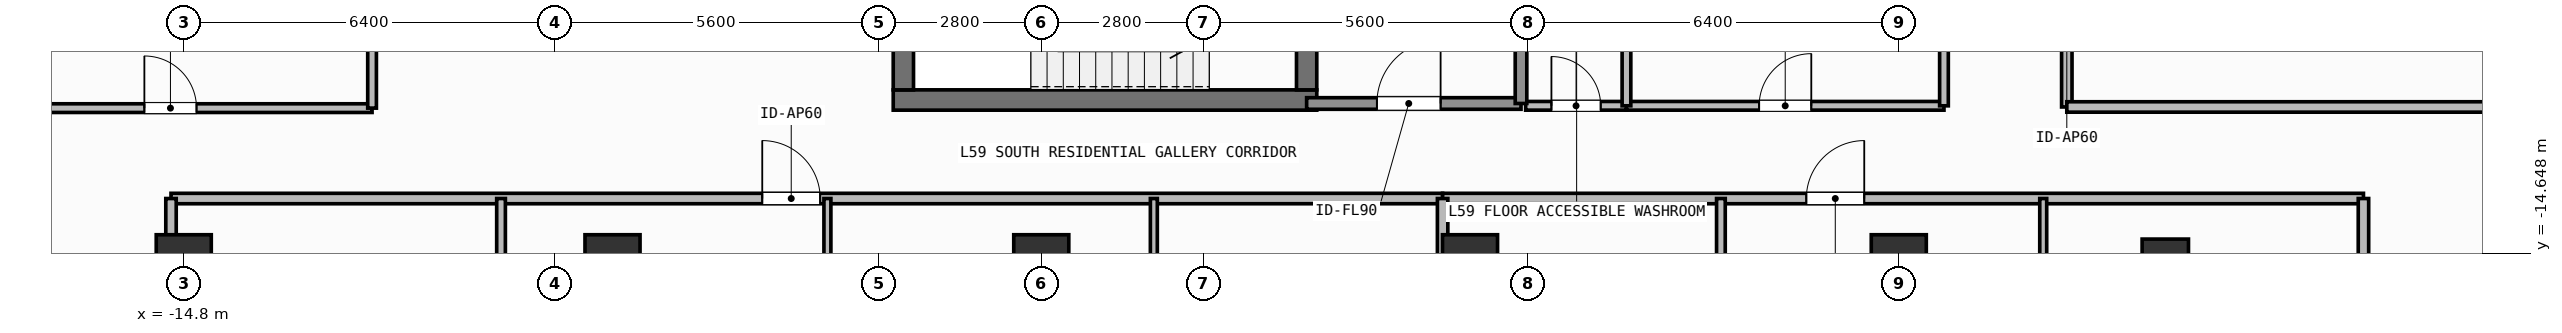
"""IFC4 building model, lengths in metres.
Left out: names, types, materials, properties, quantities, classifications, styles, units other than length and angle.
Written with IfcOpenShell. Run it as: python <this file> out.ifc"""

import sys

from ifc_helpers import new_model, si_unit, direction, frame, frame_2d, origin, origin_2d, place, context, subcontext, project, spatial, rectangle, hollow_rectangle, extrude, element, fill, save


model = new_model("IFC4")
c1 = context("Model", 3, precision=1e-05, world=origin(), true_north=direction((0.0, 1.0)))
c2 = subcontext(c1, "Body", "Model", "MODEL_VIEW")
j1 = project(units=[si_unit("LENGTHUNIT", "METRE"), si_unit("PLANEANGLEUNIT", "RADIAN")], contexts=[c1])
p1 = place(None, origin())
s1 = spatial("IfcSite", under=j1, at=p1, CompositionType="ELEMENT")
p2 = place(p1, origin())
s2 = spatial("IfcBuilding", under=s1, at=p2, CompositionType="ELEMENT")
p3 = place(p2, frame((0.0, 0.0, 243.0)))
s3 = spatial("IfcBuildingStorey", under=s2, at=p3, CompositionType="ELEMENT", Elevation=243.0)
p4 = place(p3, frame((-2.555, -12.0, 0.0), z_axis=(0.0, 0.0, 1.0), x_axis=(1.0, 0.0, 0.0)))
e1 = element("IfcWall", 1, at=p4, inside=s3, PredefinedType="SHEAR", context=c2, shape_type="SweptSolid", body=[
    extrude(rectangle(XDim=7.31, YDim=0.35, at=frame_2d((3.655, 0.0))), origin(), (0.0, 0.0, 1.0), 3.9),
])
p5 = place(p3, frame((-2.38, -11.825, 0.0), z_axis=(0.0, 0.0, 1.0), x_axis=(0.0, 1.0, 0.0)))
e2 = element("IfcWall", 2, at=p5, inside=s3, PredefinedType="SHEAR", context=c2, shape_type="SweptSolid", body=[
    extrude(rectangle(XDim=2.925, YDim=0.35, at=frame_2d((1.462, 0.0))), origin(), (0.0, 0.0, 1.0), 3.9),
])
p6 = place(p3, frame((4.58, -8.9, 0.0), z_axis=(0.0, 0.0, 1.0), x_axis=(0.0, -1.0, 0.0)))
e3 = element("IfcWall", 3, at=p6, inside=s3, PredefinedType="SHEAR", context=c2, shape_type="SweptSolid", body=[
    extrude(rectangle(XDim=2.925, YDim=0.35, at=frame_2d((1.462, 0.0))), origin(), (0.0, 0.0, 1.0), 3.9),
])
p7 = place(p6, frame((0.913, 0.0, 0.0)))
e4 = element("IfcOpeningElement", 4, at=p7, cuts=e3, PredefinedType="OPENING", context=c2, shape_type="SweptSolid", body=[
    extrude(rectangle(XDim=1.1, YDim=2.15, at=frame_2d((0.55, 1.075))), frame((0.0, 0.185, 0.0), z_axis=(0.0, -1.0, 0.0), x_axis=(1.0, 0.0, 0.0)), (0.0, 0.0, 1.0), 0.37),
])
for number, where, z_axis, x_axis in (
    (5, (-14.8, -14.8, 0.0), (0.0, 0.0, 1.0), (1.0, 0.0, 0.0)),
    (6, (-7.4, -14.8, 0.0), (0.0, 0.0, 1.0), (1.0, 0.0, 0.0)),
    (7, (0.0, -14.8, 0.0), (0.0, 0.0, 1.0), (1.0, 0.0, 0.0)),
    (8, (7.4, -14.8, 0.0), (0.0, 0.0, 1.0), (1.0, 0.0, 0.0)),
    (9, (14.8, -14.8, 0.0), (0.0, 0.0, 1.0), (1.0, 0.0, 0.0)),
):
    element("IfcColumn", number, at=place(p3, frame(where, z_axis=z_axis, x_axis=x_axis)), inside=s3, PredefinedType="COLUMN", context=c2, shape_type="SweptSolid", body=[
        extrude(rectangle(XDim=0.95, YDim=0.95, at=origin_2d()), origin(), (0.0, 0.0, 1.0), 3.9),
    ])
p8 = place(p3, frame((19.4, -14.8, 0.0), z_axis=(0.0, 0.0, 1.0), x_axis=(1.0, 0.0, 0.0)))
e10 = element("IfcColumn", 10, at=p8, inside=s3, PredefinedType="COLUMN", context=c2, shape_type="SweptSolid", body=[
    extrude(hollow_rectangle(XDim=0.8, YDim=0.8, WallThickness=0.036, at=origin_2d()), origin(), (0.0, 0.0, 1.0), 3.9),
])
p9 = place(p3, frame((4.58, -12.06, 0.0), z_axis=(0.0, 0.0, 1.0), x_axis=(1.0, 0.0, 0.0)))
e11 = element("IfcWall", 11, at=p9, inside=s3, PredefinedType="SOLIDWALL", context=c2, shape_type="SweptSolid", body=[
    extrude(rectangle(XDim=3.7, YDim=0.2, at=frame_2d((1.85, 0.0))), origin(), (0.0, 0.0, 1.0), 3.68),
])
p10 = place(p9, frame((1.212, 0.0, 0.0)))
e12 = element("IfcOpeningElement", 12, at=p10, cuts=e11, PredefinedType="OPENING", context=c2, shape_type="SweptSolid", body=[
    extrude(rectangle(XDim=1.1, YDim=2.15, at=frame_2d((0.55, 1.075))), frame((0.0, 0.11, 0.0), z_axis=(0.0, -1.0, 0.0), x_axis=(1.0, 0.0, 0.0)), (0.0, 0.0, 1.0), 0.22),
])
p11 = place(p3, frame((8.36, -12.1, 0.0), z_axis=(0.0, 0.0, 1.0), x_axis=(1.0, 0.0, 0.0)))
e13 = element("IfcWall", 13, at=p11, inside=s3, PredefinedType="PARTITIONING", context=c2, shape_type="SweptSolid", body=[
    extrude(rectangle(XDim=1.74, YDim=0.15, at=frame_2d((0.87, 0.0))), origin(), (0.0, 0.0, 1.0), 3.68),
])
p12 = place(p11, frame((0.445, 0.0, 0.0)))
e14 = element("IfcOpeningElement", 14, at=p12, cuts=e13, PredefinedType="OPENING", context=c2, shape_type="SweptSolid", body=[
    extrude(rectangle(XDim=0.85, YDim=2.1, at=frame_2d((0.425, 1.05))), frame((0.0, 0.085, 0.0), z_axis=(0.0, -1.0, 0.0), x_axis=(1.0, 0.0, 0.0)), (0.0, 0.0, 1.0), 0.17),
])
p13 = place(p3, frame((10.1, -12.1, 0.0), z_axis=(0.0, 0.0, 1.0), x_axis=(1.0, 0.0, 0.0)))
e15 = element("IfcWall", 15, at=p13, inside=s3, PredefinedType="PARTITIONING", context=c2, shape_type="SweptSolid", body=[
    extrude(rectangle(XDim=5.48, YDim=0.15, at=frame_2d((2.74, 0.0))), origin(), (0.0, 0.0, 1.0), 3.68),
])
p14 = place(p13, frame((2.29, 0.0, 0.0)))
e16 = element("IfcOpeningElement", 16, at=p14, cuts=e15, PredefinedType="OPENING", context=c2, shape_type="SweptSolid", body=[
    extrude(rectangle(XDim=0.9, YDim=2.1, at=frame_2d((0.45, 1.05))), frame((0.0, 0.085, 0.0), z_axis=(0.0, -1.0, 0.0), x_axis=(1.0, 0.0, 0.0)), (0.0, 0.0, 1.0), 0.17),
])
p15 = place(p3, frame((-15.02, -13.7, 0.0), z_axis=(0.0, 0.0, 1.0), x_axis=(1.0, 0.0, 0.0)))
e17 = element("IfcWall", 17, at=p15, inside=s3, PredefinedType="PARTITIONING", context=c2, shape_type="SweptSolid", body=[
    extrude(rectangle(XDim=21.947, YDim=0.18, at=frame_2d((10.974, 0.0))), origin(), (0.0, 0.0, 1.0), 3.68),
])
p16 = place(p15, frame((10.205, 0.0, 0.0)))
e18 = element("IfcOpeningElement", 18, at=p16, cuts=e17, PredefinedType="OPENING", context=c2, shape_type="SweptSolid", body=[
    extrude(rectangle(XDim=1.0, YDim=2.2, at=frame_2d((0.5, 1.1))), frame((0.0, 0.1, 0.0), z_axis=(0.0, -1.0, 0.0), x_axis=(1.0, 0.0, 0.0)), (0.0, 0.0, 1.0), 0.2),
])
p17 = place(p3, frame((-3.691, -24.39, 0.0), z_axis=(0.0, 0.0, 1.0), x_axis=(0.0, 1.0, 0.0)))
e19 = element("IfcWall", 19, at=p17, inside=s3, PredefinedType="PARTITIONING", context=c2, shape_type="SweptSolid", body=[
    extrude(rectangle(XDim=10.69, YDim=0.12, at=frame_2d((5.345, 0.0))), origin(), (0.0, 0.0, 1.0), 3.68),
])
p18 = place(p17, frame((4.806, 0.0, 0.0)))
e20 = element("IfcOpeningElement", 20, at=p18, cuts=e19, PredefinedType="OPENING", context=c2, shape_type="SweptSolid", body=[
    extrude(rectangle(XDim=0.9, YDim=2.1, at=frame_2d((0.45, 1.05))), frame((0.0, 0.07, 0.0), z_axis=(0.0, -1.0, 0.0), x_axis=(1.0, 0.0, 0.0)), (0.0, 0.0, 1.0), 0.14),
])
p19 = place(p3, frame((-9.324, -18.421, 0.0), z_axis=(0.0, 0.0, 1.0), x_axis=(0.0, 1.0, 0.0)))
e21 = element("IfcWall", 21, at=p19, inside=s3, PredefinedType="PARTITIONING", context=c2, shape_type="SweptSolid", body=[
    extrude(rectangle(XDim=4.721, YDim=0.15, at=frame_2d((2.36, 0.0))), origin(), (0.0, 0.0, 1.0), 3.68),
])
p20 = place(p19, frame((1.936, 0.0, 0.0)))
e22 = element("IfcOpeningElement", 22, at=p20, cuts=e21, PredefinedType="OPENING", context=c2, shape_type="SweptSolid", body=[
    extrude(rectangle(XDim=0.85, YDim=2.1, at=frame_2d((0.425, 1.05))), frame((0.0, 0.085, 0.0), z_axis=(0.0, -1.0, 0.0), x_axis=(1.0, 0.0, 0.0)), (0.0, 0.0, 1.0), 0.17),
])
p21 = place(p3, frame((1.943, -18.19, 0.0), z_axis=(0.0, 0.0, 1.0), x_axis=(0.0, 1.0, 0.0)))
e23 = element("IfcWall", 23, at=p21, inside=s3, PredefinedType="PARTITIONING", context=c2, shape_type="SweptSolid", body=[
    extrude(rectangle(XDim=4.49, YDim=0.12, at=frame_2d((2.245, 0.0))), origin(), (0.0, 0.0, 1.0), 3.68),
])
p22 = place(p21, frame((1.907, 0.0, 0.0)))
e24 = element("IfcOpeningElement", 24, at=p22, cuts=e23, PredefinedType="OPENING", context=c2, shape_type="SweptSolid", body=[
    extrude(rectangle(XDim=0.85, YDim=2.1, at=frame_2d((0.425, 1.05))), frame((0.0, 0.07, 0.0), z_axis=(0.0, -1.0, 0.0), x_axis=(1.0, 0.0, 0.0)), (0.0, 0.0, 1.0), 0.14),
])
p23 = place(p3, frame((6.927, -13.7, 0.0), z_axis=(0.0, 0.0, 1.0), x_axis=(1.0, 0.0, 0.0)))
e25 = element("IfcWall", 25, at=p23, inside=s3, PredefinedType="PARTITIONING", context=c2, shape_type="SweptSolid", body=[
    extrude(rectangle(XDim=15.893, YDim=0.18, at=frame_2d((7.947, 0.0))), origin(), (0.0, 0.0, 1.0), 3.68),
])
p24 = place(p23, frame((6.277, 0.0, 0.0)))
e26 = element("IfcOpeningElement", 26, at=p24, cuts=e25, PredefinedType="OPENING", context=c2, shape_type="SweptSolid", body=[
    extrude(rectangle(XDim=1.0, YDim=2.2, at=frame_2d((0.5, 1.1))), frame((0.0, 0.1, 0.0), z_axis=(0.0, -1.0, 0.0), x_axis=(1.0, 0.0, 0.0)), (0.0, 0.0, 1.0), 0.2),
])
p25 = place(p3, frame((11.73, -18.19, 0.0), z_axis=(0.0, 0.0, 1.0), x_axis=(0.0, 1.0, 0.0)))
e27 = element("IfcWall", 27, at=p25, inside=s3, PredefinedType="PARTITIONING", context=c2, shape_type="SweptSolid", body=[
    extrude(rectangle(XDim=4.49, YDim=0.15, at=frame_2d((2.245, 0.0))), origin(), (0.0, 0.0, 1.0), 3.68),
])
p26 = place(p25, frame((1.907, 0.0, 0.0)))
e28 = element("IfcOpeningElement", 28, at=p26, cuts=e27, PredefinedType="OPENING", context=c2, shape_type="SweptSolid", body=[
    extrude(rectangle(XDim=0.85, YDim=2.1, at=frame_2d((0.425, 1.05))), frame((0.0, 0.085, 0.0), z_axis=(0.0, -1.0, 0.0), x_axis=(1.0, 0.0, 0.0)), (0.0, 0.0, 1.0), 0.17),
])
p27 = place(p3, frame((17.293, -18.19, 0.0), z_axis=(0.0, 0.0, 1.0), x_axis=(0.0, 1.0, 0.0)))
e29 = element("IfcWall", 29, at=p27, inside=s3, PredefinedType="PARTITIONING", context=c2, shape_type="SweptSolid", body=[
    extrude(rectangle(XDim=4.49, YDim=0.12, at=frame_2d((2.245, 0.0))), origin(), (0.0, 0.0, 1.0), 3.68),
])
p28 = place(p27, frame((1.907, 0.0, 0.0)))
e30 = element("IfcOpeningElement", 30, at=p28, cuts=e29, PredefinedType="OPENING", context=c2, shape_type="SweptSolid", body=[
    extrude(rectangle(XDim=0.85, YDim=2.1, at=frame_2d((0.425, 1.05))), frame((0.0, 0.07, 0.0), z_axis=(0.0, -1.0, 0.0), x_axis=(1.0, 0.0, 0.0)), (0.0, 0.0, 1.0), 0.14),
])
p29 = place(p3, frame((-18.33, -12.14, 0.0), z_axis=(0.0, 0.0, 1.0), x_axis=(1.0, 0.0, 0.0)))
e31 = element("IfcWall", 31, at=p29, inside=s3, PredefinedType="PARTITIONING", context=c2, shape_type="SweptSolid", body=[
    extrude(rectangle(XDim=6.78, YDim=0.15, at=frame_2d((3.39, 0.0))), origin(), (0.0, 0.0, 1.0), 3.68),
])
p30 = place(p29, frame((2.85, 0.0, 0.0)))
e32 = element("IfcOpeningElement", 32, at=p30, cuts=e31, PredefinedType="OPENING", context=c2, shape_type="SweptSolid", body=[
    extrude(rectangle(XDim=0.9, YDim=2.1, at=frame_2d((0.45, 1.05))), frame((0.0, 0.085, 0.0), z_axis=(0.0, -1.0, 0.0), x_axis=(1.0, 0.0, 0.0)), (0.0, 0.0, 1.0), 0.17),
])
p31 = place(p3, frame((17.7, -12.12, 0.0), z_axis=(0.0, 0.0, 1.0), x_axis=(0.0, 1.0, 0.0)))
e33 = element("IfcWall", 33, at=p31, inside=s3, PredefinedType="PARTITIONING", context=c2, shape_type="SweptSolid", body=[
    extrude(rectangle(XDim=8.98, YDim=0.18, at=frame_2d((4.49, 0.0))), origin(), (0.0, 0.0, 1.0), 3.68),
])
p32 = place(p31, frame((1.407, 0.0, 0.0)))
e34 = element("IfcOpeningElement", 34, at=p32, cuts=e33, PredefinedType="OPENING", context=c2, shape_type="SweptSolid", body=[
    extrude(rectangle(XDim=1.0, YDim=2.2, at=frame_2d((0.5, 1.1))), frame((0.0, 0.1, 0.0), z_axis=(0.0, -1.0, 0.0), x_axis=(1.0, 0.0, 0.0)), (0.0, 0.0, 1.0), 0.2),
])
p33 = place(p3, frame((8.28, -12.06, 0.0), z_axis=(0.0, 0.0, 1.0), x_axis=(0.0, 1.0, 0.0)))
e35 = element("IfcWall", 35, at=p33, inside=s3, PredefinedType="SOLIDWALL", context=c2, shape_type="SweptSolid", body=[
    extrude(rectangle(XDim=3.335, YDim=0.2, at=frame_2d((1.667, 0.0))), origin(), (0.0, 0.0, 1.0), 3.68),
])
p34 = place(p3, frame((10.1, -12.1, 0.0), z_axis=(0.0, 0.0, 1.0), x_axis=(0.0, 1.0, 0.0)))
e36 = element("IfcWall", 36, at=p34, inside=s3, PredefinedType="PARTITIONING", context=c2, shape_type="SweptSolid", body=[
    extrude(rectangle(XDim=2.35, YDim=0.15, at=frame_2d((1.175, 0.0))), origin(), (0.0, 0.0, 1.0), 3.68),
])
p35 = place(p3, frame((15.58, -12.1, 0.0), z_axis=(0.0, 0.0, 1.0), x_axis=(0.0, 1.0, 0.0)))
e37 = element("IfcWall", 37, at=p35, inside=s3, PredefinedType="PARTITIONING", context=c2, shape_type="SweptSolid", body=[
    extrude(rectangle(XDim=6.25, YDim=0.15, at=frame_2d((3.125, 0.0))), origin(), (0.0, 0.0, 1.0), 3.68),
])
p36 = place(p3, frame((6.927, -28.63, 0.0), z_axis=(0.0, 0.0, 1.0), x_axis=(0.0, 1.0, 0.0)))
e38 = element("IfcWall", 38, at=p36, inside=s3, PredefinedType="PARTITIONING", context=c2, shape_type="SweptSolid", body=[
    extrude(rectangle(XDim=14.93, YDim=0.18, at=frame_2d((7.465, 0.0))), origin(), (0.0, 0.0, 1.0), 3.68),
])
for number, where, z_axis, x_axis in (
    (39, (-15.02, -27.51, 0.0), (0.0, 0.0, 1.0), (0.0, 1.0, 0.0)),
    (40, (22.82, -27.51, 0.0), (0.0, 0.0, 1.0), (0.0, 1.0, 0.0)),
):
    element("IfcWall", number, at=place(p3, frame(where, z_axis=z_axis, x_axis=x_axis)), inside=s3, PredefinedType="PARTITIONING", context=c2, shape_type="SweptSolid", body=[
        extrude(rectangle(XDim=13.81, YDim=0.18, at=frame_2d((6.905, 0.0))), origin(), (0.0, 0.0, 1.0), 3.68),
    ])
p37 = place(p3, frame((-11.55, -12.14, 0.0), z_axis=(0.0, 0.0, 1.0), x_axis=(0.0, 1.0, 0.0)))
e41 = element("IfcWall", 41, at=p37, inside=s3, PredefinedType="PARTITIONING", context=c2, shape_type="SweptSolid", body=[
    extrude(rectangle(XDim=15.09, YDim=0.15, at=frame_2d((7.545, 0.0))), origin(), (0.0, 0.0, 1.0), 3.68),
])
p38 = place(p3, frame((17.7, -12.12, 0.0), z_axis=(0.0, 0.0, 1.0), x_axis=(1.0, 0.0, 0.0)))
e42 = element("IfcWall", 42, at=p38, inside=s3, PredefinedType="PARTITIONING", context=c2, shape_type="SweptSolid", body=[
    extrude(rectangle(XDim=8.43, YDim=0.18, at=frame_2d((4.215, 0.0))), origin(), (0.0, 0.0, 1.0), 3.68),
])
p39 = place(p10, origin())
e43 = element("IfcDoor", 43, at=p39, inside=s3, OperationType="SINGLE_SWING_RIGHT", PredefinedType="DOOR", context=c2, shape_type="SweptSolid", body=[
    extrude(rectangle(XDim=1.1, YDim=2.15, at=frame_2d((0.55, 1.075))), frame((0.0, 0.025, 0.0), z_axis=(0.0, -1.0, 0.0), x_axis=(1.0, 0.0, 0.0)), (0.0, 0.0, 1.0), 0.05),
])
fill(e12, e43)
p40 = place(p12, origin())
e44 = element("IfcDoor", 44, at=p40, inside=s3, OperationType="SINGLE_SWING_LEFT", PredefinedType="DOOR", context=c2, shape_type="SweptSolid", body=[
    extrude(rectangle(XDim=0.85, YDim=2.1, at=frame_2d((0.425, 1.05))), frame((0.0, 0.025, 0.0), z_axis=(0.0, -1.0, 0.0), x_axis=(1.0, 0.0, 0.0)), (0.0, 0.0, 1.0), 0.05),
])
fill(e14, e44)
p41 = place(p14, origin())
e45 = element("IfcDoor", 45, at=p41, inside=s3, OperationType="SINGLE_SWING_RIGHT", PredefinedType="DOOR", context=c2, shape_type="SweptSolid", body=[
    extrude(rectangle(XDim=0.9, YDim=2.1, at=frame_2d((0.45, 1.05))), frame((0.0, 0.025, 0.0), z_axis=(0.0, -1.0, 0.0), x_axis=(1.0, 0.0, 0.0)), (0.0, 0.0, 1.0), 0.05),
])
fill(e16, e45)
p42 = place(p16, origin())
e46 = element("IfcDoor", 46, at=p42, inside=s3, OperationType="SINGLE_SWING_LEFT", PredefinedType="DOOR", context=c2, shape_type="SweptSolid", body=[
    extrude(rectangle(XDim=1.0, YDim=2.2, at=frame_2d((0.5, 1.1))), frame((0.0, 0.025, 0.0), z_axis=(0.0, -1.0, 0.0), x_axis=(1.0, 0.0, 0.0)), (0.0, 0.0, 1.0), 0.05),
])
fill(e18, e46)
p43 = place(p24, origin())
e47 = element("IfcDoor", 47, at=p43, inside=s3, OperationType="SINGLE_SWING_RIGHT", PredefinedType="DOOR", context=c2, shape_type="SweptSolid", body=[
    extrude(rectangle(XDim=1.0, YDim=2.2, at=frame_2d((0.5, 1.1))), frame((0.0, 0.025, 0.0), z_axis=(0.0, -1.0, 0.0), x_axis=(1.0, 0.0, 0.0)), (0.0, 0.0, 1.0), 0.05),
])
fill(e26, e47)
p44 = place(p30, origin())
e48 = element("IfcDoor", 48, at=p44, inside=s3, OperationType="SINGLE_SWING_LEFT", PredefinedType="DOOR", context=c2, shape_type="SweptSolid", body=[
    extrude(rectangle(XDim=0.9, YDim=2.1, at=frame_2d((0.45, 1.05))), frame((0.0, 0.025, 0.0), z_axis=(0.0, -1.0, 0.0), x_axis=(1.0, 0.0, 0.0)), (0.0, 0.0, 1.0), 0.05),
])
fill(e32, e48)
save(model, sys.argv[1])
